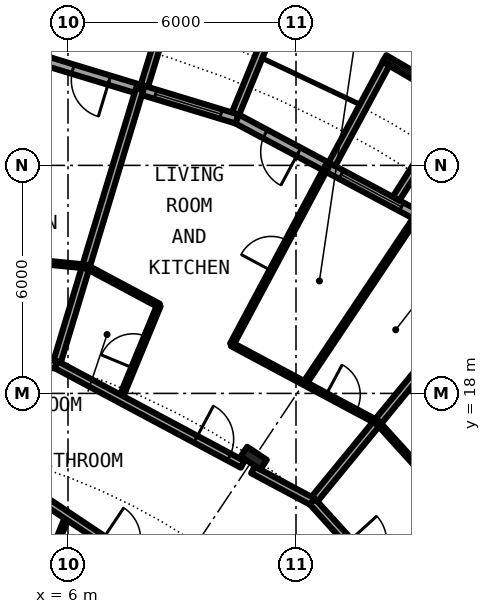
"""IFC4 building model, lengths in metres.
Left out: names, types, materials, properties, quantities, classifications, styles, units other than length and angle.
Written with IfcOpenShell. Run it as: python <this file> out.ifc"""

import sys

from ifc_helpers import new_model, si_unit, direction, frame, frame_2d, origin, origin_2d, place, context, subcontext, project, spatial, rectangle, circle, i_section, extrude, element, fill, save


model = new_model("IFC4")
c1 = context("Model", 3, precision=1e-05, world=origin(), true_north=direction((0.0, 1.0)))
c2 = subcontext(c1, "Body", "Model", "MODEL_VIEW")
j1 = project(units=[si_unit("LENGTHUNIT", "METRE"), si_unit("PLANEANGLEUNIT", "RADIAN")], contexts=[c1])
p1 = place(None, origin())
s1 = spatial("IfcSite", under=j1, at=p1, CompositionType="ELEMENT")
p2 = place(p1, origin())
s2 = spatial("IfcBuilding", under=s1, at=p2, CompositionType="ELEMENT")
p3 = place(p2, frame((0.0, 0.0, 22.8)))
s3 = spatial("IfcBuildingStorey", under=s2, at=p3, CompositionType="ELEMENT", Elevation=22.8)
p4 = place(p3, frame((10.889, 16.297, 0.0), z_axis=(0.0, 0.0, 1.0), x_axis=(0.55557023302, 0.831469612303, 0.0)))
e1 = element("IfcColumn", 1, at=p4, inside=s3, PredefinedType="COLUMN", context=c2, shape_type="SweptSolid", body=[
    extrude(i_section(OverallWidth=0.305, OverallDepth=0.62, WebThickness=0.021, FlangeThickness=0.04, FilletRadius=0.027, at=origin_2d()), origin(), (0.0, 0.0, 1.0), 3.05),
])
p5 = place(p3, frame((15.167, 22.699, 0.0), z_axis=(0.0, 0.0, 1.0), x_axis=(-0.881915646801, 0.471407246368, 0.0)))
e2 = element("IfcWall", 2, at=p5, inside=s3, PredefinedType="SOLIDWALL", context=c2, shape_type="SweptSolid", body=[
    extrude(rectangle(XDim=5.352, YDim=0.25, at=frame_2d((2.676, 0.0))), origin(), (0.0, 0.0, 1.0), 2.7),
])
p6 = place(p5, frame((0.441, 0.0, 0.3)))
e3 = element("IfcOpeningElement", 3, at=p6, cuts=e2, PredefinedType="OPENING", context=c2, shape_type="SweptSolid", body=[
    extrude(rectangle(XDim=1.8, YDim=2.1, at=frame_2d((0.9, 1.05))), frame((0.0, 0.135, 0.0), z_axis=(0.0, -1.0, 0.0), x_axis=(1.0, 0.0, 0.0)), (0.0, 0.0, 1.0), 0.27),
])
p7 = place(p5, frame((3.51, 0.0, 0.0)))
e4 = element("IfcOpeningElement", 4, at=p7, cuts=e2, PredefinedType="OPENING", context=c2, shape_type="SweptSolid", body=[
    extrude(rectangle(XDim=1.0, YDim=2.2, at=frame_2d((0.5, 1.1))), frame((0.0, 0.135, 0.0), z_axis=(0.0, -1.0, 0.0), x_axis=(1.0, 0.0, 0.0)), (0.0, 0.0, 1.0), 0.27),
])
p8 = place(p3, frame((16.344, 25.633, -0.03), z_axis=(0.0, 0.0, 1.0), x_axis=(-0.863346521872, 0.504611517081, 0.0)))
e5 = element("IfcWall", 5, at=p8, inside=s3, PredefinedType="SOLIDWALL", context=c2, shape_type="SweptSolid", body=[
    extrude(rectangle(XDim=2.336, YDim=0.2, at=frame_2d((1.168, 0.0))), origin(), (0.0, 0.0, 1.0), 2.73),
])
p9 = place(p8, frame((0.128, 0.0, 0.33)))
e6 = element("IfcOpeningElement", 6, at=p9, cuts=e5, PredefinedType="OPENING", context=c2, shape_type="SweptSolid", body=[
    extrude(circle(Radius=1.04, at=frame_2d((1.04, 1.04))), frame((0.0, 0.11, 0.0), z_axis=(0.0, -1.0, 0.0), x_axis=(1.0, 0.0, 0.0)), (0.0, 0.0, 1.0), 0.22),
])
p10 = place(p3, frame((14.635, 23.126, -0.03), z_axis=(0.0, 0.0, 1.0), x_axis=(0.534437802731, 0.845207805816, 0.0)))
e7 = element("IfcWall", 7, at=p10, inside=s3, PredefinedType="SOLIDWALL", context=c2, shape_type="SweptSolid", body=[
    extrude(rectangle(XDim=2.932, YDim=0.2, at=frame_2d((1.466, 0.0))), origin(), (0.0, 0.0, 1.0), 2.73),
])
p11 = place(p3, frame((12.945, 24.029, -0.03), z_axis=(0.0, 0.0, 1.0), x_axis=(0.474424310775, 0.88029629861, 0.0)))
e8 = element("IfcWall", 8, at=p11, inside=s3, PredefinedType="SOLIDWALL", context=c2, shape_type="SweptSolid", body=[
    extrude(rectangle(XDim=3.006, YDim=0.2, at=frame_2d((1.503, 0.0))), origin(), (0.0, 0.0, 1.0), 2.73),
])
p12 = place(p3, frame((10.447, 25.222, 0.0), z_axis=(0.0, 0.0, 1.0), x_axis=(-0.956965678721, 0.290201119486, 0.0)))
e9 = element("IfcWall", 9, at=p12, inside=s3, PredefinedType="SOLIDWALL", context=c2, shape_type="SweptSolid", body=[
    extrude(rectangle(XDim=5.351, YDim=0.25, at=frame_2d((2.676, 0.0))), origin(), (0.0, 0.0, 1.0), 2.7),
])
p13 = place(p12, frame((0.441, 0.0, 0.3)))
e10 = element("IfcOpeningElement", 10, at=p13, cuts=e9, PredefinedType="OPENING", context=c2, shape_type="SweptSolid", body=[
    extrude(rectangle(XDim=1.8, YDim=2.1, at=frame_2d((0.9, 1.05))), frame((0.0, 0.135, 0.0), z_axis=(0.0, -1.0, 0.0), x_axis=(1.0, 0.0, 0.0)), (0.0, 0.0, 1.0), 0.27),
])
p14 = place(p12, frame((3.51, 0.0, 0.0)))
e11 = element("IfcOpeningElement", 11, at=p14, cuts=e9, PredefinedType="OPENING", context=c2, shape_type="SweptSolid", body=[
    extrude(rectangle(XDim=1.0, YDim=2.2, at=frame_2d((0.5, 1.1))), frame((0.0, 0.135, 0.0), z_axis=(0.0, -1.0, 0.0), x_axis=(1.0, 0.0, 0.0)), (0.0, 0.0, 1.0), 0.27),
])
p15 = place(p3, frame((10.409, 25.364, -0.03), z_axis=(0.0, 0.0, 1.0), x_axis=(0.379509886562, 0.925187681501, 0.0)))
e12 = element("IfcWall", 12, at=p15, inside=s3, PredefinedType="SOLIDWALL", context=c2, shape_type="SweptSolid", body=[
    extrude(rectangle(XDim=2.883, YDim=0.2, at=frame_2d((1.441, 0.0))), origin(), (0.0, 0.0, 1.0), 2.73),
])
p16 = place(p3, frame((8.009, 26.092, -0.03), z_axis=(0.0, 0.0, 1.0), x_axis=(0.293406695073, 0.955987715029, 0.0)))
e13 = element("IfcWall", 13, at=p16, inside=s3, PredefinedType="SOLIDWALL", context=c2, shape_type="SweptSolid", body=[
    extrude(rectangle(XDim=3.006, YDim=0.2, at=frame_2d((1.503, 0.0))), origin(), (0.0, 0.0, 1.0), 2.73),
])
p17 = place(p3, frame((5.69, 18.756, 0.0), z_axis=(0.0, 0.0, 1.0), x_axis=(0.29005838641, 0.957008951094, 0.0)))
e14 = element("IfcWall", 14, at=p17, inside=s3, PredefinedType="PARTITIONING", context=c2, shape_type="SweptSolid", body=[
    extrude(rectangle(XDim=7.574, YDim=0.2, at=frame_2d((3.787, 0.0))), origin(), (0.0, 0.0, 1.0), 2.7),
])
p18 = place(p3, frame((5.029, 12.418, 0.0), z_axis=(0.0, 0.0, 1.0), x_axis=(0.375649498413, 0.926761811008, 0.0)))
e15 = element("IfcWall", 15, at=p18, inside=s3, PredefinedType="PARTITIONING", context=c2, shape_type="SweptSolid", body=[
    extrude(rectangle(XDim=2.548, YDim=0.1, at=frame_2d((1.274, 0.0))), origin(), (0.0, 0.0, 1.0), 2.7),
])
p19 = place(p3, frame((7.376, 17.855, 0.0), z_axis=(0.0, 0.0, 1.0), x_axis=(0.38190329031, 0.924202292169, 0.0)))
e16 = element("IfcWall", 16, at=p19, inside=s3, PredefinedType="PARTITIONING", context=c2, shape_type="SweptSolid", body=[
    extrude(rectangle(XDim=2.661, YDim=0.1, at=frame_2d((1.33, 0.0))), origin(), (0.0, 0.0, 1.0), 2.7),
])
p20 = place(p19, frame((0.88, 0.0, 0.0)))
e17 = element("IfcOpeningElement", 17, at=p20, cuts=e16, PredefinedType="OPENING", context=c2, shape_type="SweptSolid", body=[
    extrude(rectangle(XDim=0.9, YDim=2.3, at=frame_2d((0.45, 1.15))), frame((0.0, 0.06, 0.0), z_axis=(0.0, -1.0, 0.0), x_axis=(1.0, 0.0, 0.0)), (0.0, 0.0, 1.0), 0.12),
])
p21 = place(p3, frame((10.31, 19.289, 0.0), z_axis=(0.0, 0.0, 1.0), x_axis=(0.47140999111, 0.881914179658, 0.0)))
e18 = element("IfcWall", 18, at=p21, inside=s3, PredefinedType="PARTITIONING", context=c2, shape_type="SweptSolid", body=[
    extrude(rectangle(XDim=5.303, YDim=0.1, at=frame_2d((2.652, 0.0))), origin(), (0.0, 0.0, 1.0), 2.7),
])
p22 = place(p21, frame((2.202, 0.0, 0.0)))
e19 = element("IfcOpeningElement", 19, at=p22, cuts=e18, PredefinedType="OPENING", context=c2, shape_type="SweptSolid", body=[
    extrude(rectangle(XDim=0.9, YDim=2.3, at=frame_2d((0.45, 1.15))), frame((0.0, 0.06, 0.0), z_axis=(0.0, -1.0, 0.0), x_axis=(1.0, 0.0, 0.0)), (0.0, 0.0, 1.0), 0.12),
])
p23 = place(p3, frame((12.229, 18.264, 0.0), z_axis=(0.0, 0.0, 1.0), x_axis=(0.556271707676, 0.83100047367, 0.0)))
e20 = element("IfcWall", 20, at=p23, inside=s3, PredefinedType="PARTITIONING", context=c2, shape_type="SweptSolid", body=[
    extrude(rectangle(XDim=5.195, YDim=0.1, at=frame_2d((2.598, 0.0))), origin(), (0.0, 0.0, 1.0), 2.7),
])
p24 = place(p3, frame((12.432, 15.152, 0.0), z_axis=(0.0, 0.0, 1.0), x_axis=(0.634353152115, 0.77304338714, 0.0)))
e21 = element("IfcWall", 21, at=p24, inside=s3, PredefinedType="PARTITIONING", context=c2, shape_type="SweptSolid", body=[
    extrude(rectangle(XDim=7.576, YDim=0.2, at=frame_2d((3.788, 0.0))), origin(), (0.0, 0.0, 1.0), 2.7),
])
p25 = place(p3, frame((3.299, 16.574, 0.0), z_axis=(0.0, 0.0, 1.0), x_axis=(0.831482209042, -0.555551380205, 0.0)))
e22 = element("IfcWall", 22, at=p25, inside=s3, PredefinedType="PARTITIONING", context=c2, shape_type="SweptSolid", body=[
    extrude(rectangle(XDim=11.315, YDim=0.2, at=frame_2d((5.657, 0.0))), origin(), (0.0, 0.0, 1.0), 2.7),
])
p26 = place(p25, frame((4.346, 0.0, 0.0)))
e23 = element("IfcOpeningElement", 23, at=p26, cuts=e22, PredefinedType="OPENING", context=c2, shape_type="SweptSolid", body=[
    extrude(rectangle(XDim=1.0, YDim=2.3, at=frame_2d((0.5, 1.15))), frame((0.0, 0.11, 0.0), z_axis=(0.0, -1.0, 0.0), x_axis=(1.0, 0.0, 0.0)), (0.0, 0.0, 1.0), 0.22),
])
p27 = place(p3, frame((3.921, 18.93, 0.0), z_axis=(0.0, 0.0, 1.0), x_axis=(0.995207057161, -0.097790149696, 0.0)))
e24 = element("IfcWall", 24, at=p27, inside=s3, PredefinedType="PARTITIONING", context=c2, shape_type="SweptSolid", body=[
    extrude(rectangle(XDim=1.778, YDim=0.2, at=frame_2d((0.889, 0.0))), origin(), (0.0, 0.0, 1.0), 2.38),
])
p28 = place(p3, frame((5.69, 18.756, 0.0), z_axis=(0.0, 0.0, 1.0), x_axis=(0.881866548297, -0.471499089072, 0.0)))
e25 = element("IfcWall", 25, at=p28, inside=s3, PredefinedType="PARTITIONING", context=c2, shape_type="SweptSolid", body=[
    extrude(rectangle(XDim=5.563, YDim=0.2, at=frame_2d((2.782, 0.0))), origin(), (0.0, 0.0, 1.0), 2.38),
])
p29 = place(p28, frame((4.161, 0.0, 0.0)))
e26 = element("IfcOpeningElement", 26, at=p29, cuts=e25, PredefinedType="OPENING", context=c2, shape_type="SweptSolid", body=[
    extrude(rectangle(XDim=1.0, YDim=2.3, at=frame_2d((0.5, 1.15))), frame((0.0, 0.11, 0.0), z_axis=(0.0, -1.0, 0.0), x_axis=(1.0, 0.0, 0.0)), (0.0, 0.0, 1.0), 0.22),
])
p30 = place(p3, frame((10.867, 15.989, 0.0), z_axis=(0.0, 0.0, 1.0), x_axis=(0.88180855718, -0.471607536501, 0.0)))
e27 = element("IfcWall", 27, at=p30, inside=s3, PredefinedType="PARTITIONING", context=c2, shape_type="SweptSolid", body=[
    extrude(rectangle(XDim=1.777, YDim=0.2, at=frame_2d((0.889, 0.0))), origin(), (0.0, 0.0, 1.0), 2.38),
])
p31 = place(p3, frame((12.434, 15.151, 0.0), z_axis=(0.0, 0.0, 1.0), x_axis=(0.671514934772, -0.740991020444, 0.0)))
e28 = element("IfcWall", 28, at=p31, inside=s3, PredefinedType="PARTITIONING", context=c2, shape_type="SweptSolid", body=[
    extrude(rectangle(XDim=5.598, YDim=0.2, at=frame_2d((2.799, 0.0))), origin(), (0.0, 0.0, 1.0), 2.38),
])
p32 = place(p31, frame((1.417, 0.0, 0.0)))
e29 = element("IfcOpeningElement", 29, at=p32, cuts=e28, PredefinedType="OPENING", context=c2, shape_type="SweptSolid", body=[
    extrude(rectangle(XDim=1.0, YDim=2.3, at=frame_2d((0.5, 1.15))), frame((0.0, 0.11, 0.0), z_axis=(0.0, -1.0, 0.0), x_axis=(1.0, 0.0, 0.0)), (0.0, 0.0, 1.0), 0.22),
])
p33 = place(p3, frame((4.313, 21.552, 0.0), z_axis=(0.0, 0.0, 1.0), x_axis=(0.995195976339, -0.097902853268, 0.0)))
e30 = element("IfcWall", 30, at=p33, inside=s3, PredefinedType="PARTITIONING", context=c2, shape_type="SweptSolid", body=[
    extrude(rectangle(XDim=2.175, YDim=0.1, at=frame_2d((1.087, 0.0))), origin(), (0.0, 0.0, 1.0), 2.7),
])
p34 = place(p3, frame((6.473, 21.34, 0.0), z_axis=(0.0, 0.0, 1.0), x_axis=(0.881864921102, -0.471502132476, 0.0)))
e31 = element("IfcWall", 31, at=p34, inside=s3, PredefinedType="PARTITIONING", context=c2, shape_type="SweptSolid", body=[
    extrude(rectangle(XDim=2.176, YDim=0.1, at=frame_2d((1.088, 0.0))), origin(), (0.0, 0.0, 1.0), 2.7),
])
p35 = place(p3, frame((10.312, 19.288, 0.0), z_axis=(0.0, 0.0, 1.0), x_axis=(0.881763472003, -0.471691826769, 0.0)))
e32 = element("IfcWall", 32, at=p35, inside=s3, PredefinedType="PARTITIONING", context=c2, shape_type="SweptSolid", body=[
    extrude(rectangle(XDim=4.35, YDim=0.1, at=frame_2d((2.175, 0.0))), origin(), (0.0, 0.0, 1.0), 2.7),
])
p36 = place(p35, frame((2.811, 0.0, 0.0)))
e33 = element("IfcOpeningElement", 33, at=p36, cuts=e32, PredefinedType="OPENING", context=c2, shape_type="SweptSolid", body=[
    extrude(rectangle(XDim=0.9, YDim=2.3, at=frame_2d((0.45, 1.15))), frame((0.0, 0.06, 0.0), z_axis=(0.0, -1.0, 0.0), x_axis=(1.0, 0.0, 0.0)), (0.0, 0.0, 1.0), 0.12),
])
p37 = place(p3, frame((14.147, 17.238, 0.0), z_axis=(0.0, 0.0, 1.0), x_axis=(0.671674967707, -0.740845960882, 0.0)))
e34 = element("IfcWall", 34, at=p37, inside=s3, PredefinedType="PARTITIONING", context=c2, shape_type="SweptSolid", body=[
    extrude(rectangle(XDim=2.181, YDim=0.1, at=frame_2d((1.091, 0.0))), origin(), (0.0, 0.0, 1.0), 2.7),
])
p38 = place(p6, origin())
e35 = element("IfcWindow", 35, at=p38, inside=s3, PartitioningType="SINGLE_PANEL", PredefinedType="WINDOW", context=c2, shape_type="SweptSolid", body=[
    extrude(rectangle(XDim=1.8, YDim=2.1, at=frame_2d((0.9, 1.05))), frame((0.0, 0.03, 0.0), z_axis=(0.0, -1.0, 0.0), x_axis=(1.0, 0.0, 0.0)), (0.0, 0.0, 1.0), 0.06),
])
fill(e3, e35)
p39 = place(p9, origin())
e36 = element("IfcWindow", 36, at=p39, inside=s3, PartitioningType="SINGLE_PANEL", PredefinedType="WINDOW", context=c2, shape_type="SweptSolid", body=[
    extrude(circle(Radius=1.04, at=frame_2d((1.04, 1.04))), frame((0.0, 0.03, 0.0), z_axis=(0.0, -1.0, 0.0), x_axis=(1.0, 0.0, 0.0)), (0.0, 0.0, 1.0), 0.06),
])
fill(e6, e36)
p40 = place(p7, origin())
e37 = element("IfcDoor", 37, at=p40, inside=s3, OperationType="SINGLE_SWING_LEFT", PredefinedType="DOOR", context=c2, shape_type="SweptSolid", body=[
    extrude(rectangle(XDim=1.0, YDim=2.2, at=frame_2d((0.5, 1.1))), frame((0.0, 0.025, 0.0), z_axis=(0.0, -1.0, 0.0), x_axis=(1.0, 0.0, 0.0)), (0.0, 0.0, 1.0), 0.05),
])
fill(e4, e37)
p41 = place(p13, origin())
e38 = element("IfcWindow", 38, at=p41, inside=s3, PartitioningType="SINGLE_PANEL", PredefinedType="WINDOW", context=c2, shape_type="SweptSolid", body=[
    extrude(rectangle(XDim=1.8, YDim=2.1, at=frame_2d((0.9, 1.05))), frame((0.0, 0.03, 0.0), z_axis=(0.0, -1.0, 0.0), x_axis=(1.0, 0.0, 0.0)), (0.0, 0.0, 1.0), 0.06),
])
fill(e10, e38)
p42 = place(p14, origin())
e39 = element("IfcDoor", 39, at=p42, inside=s3, OperationType="SINGLE_SWING_LEFT", PredefinedType="DOOR", context=c2, shape_type="SweptSolid", body=[
    extrude(rectangle(XDim=1.0, YDim=2.2, at=frame_2d((0.5, 1.1))), frame((0.0, 0.025, 0.0), z_axis=(0.0, -1.0, 0.0), x_axis=(1.0, 0.0, 0.0)), (0.0, 0.0, 1.0), 0.05),
])
fill(e11, e39)
p43 = place(p29, origin())
e40 = element("IfcDoor", 40, at=p43, inside=s3, OperationType="SINGLE_SWING_RIGHT", PredefinedType="DOOR", context=c2, shape_type="SweptSolid", body=[
    extrude(rectangle(XDim=1.0, YDim=2.3, at=frame_2d((0.5, 1.15))), frame((0.0, 0.025, 0.0), z_axis=(0.0, -1.0, 0.0), x_axis=(1.0, 0.0, 0.0)), (0.0, 0.0, 1.0), 0.05),
])
fill(e26, e40)
p44 = place(p20, origin())
e41 = element("IfcDoor", 41, at=p44, inside=s3, OperationType="SINGLE_SWING_RIGHT", PredefinedType="DOOR", context=c2, shape_type="SweptSolid", body=[
    extrude(rectangle(XDim=0.9, YDim=2.3, at=frame_2d((0.45, 1.15))), frame((0.0, 0.025, 0.0), z_axis=(0.0, -1.0, 0.0), x_axis=(1.0, 0.0, 0.0)), (0.0, 0.0, 1.0), 0.05),
])
fill(e17, e41)
p45 = place(p22, origin())
e42 = element("IfcDoor", 42, at=p45, inside=s3, OperationType="SINGLE_SWING_RIGHT", PredefinedType="DOOR", context=c2, shape_type="SweptSolid", body=[
    extrude(rectangle(XDim=0.9, YDim=2.3, at=frame_2d((0.45, 1.15))), frame((0.0, 0.025, 0.0), z_axis=(0.0, -1.0, 0.0), x_axis=(1.0, 0.0, 0.0)), (0.0, 0.0, 1.0), 0.05),
])
fill(e19, e42)
p46 = place(p36, origin())
e43 = element("IfcDoor", 43, at=p46, inside=s3, OperationType="SINGLE_SWING_RIGHT", PredefinedType="DOOR", context=c2, shape_type="SweptSolid", body=[
    extrude(rectangle(XDim=0.9, YDim=2.3, at=frame_2d((0.45, 1.15))), frame((0.0, 0.025, 0.0), z_axis=(0.0, -1.0, 0.0), x_axis=(1.0, 0.0, 0.0)), (0.0, 0.0, 1.0), 0.05),
])
fill(e33, e43)
save(model, sys.argv[1])
